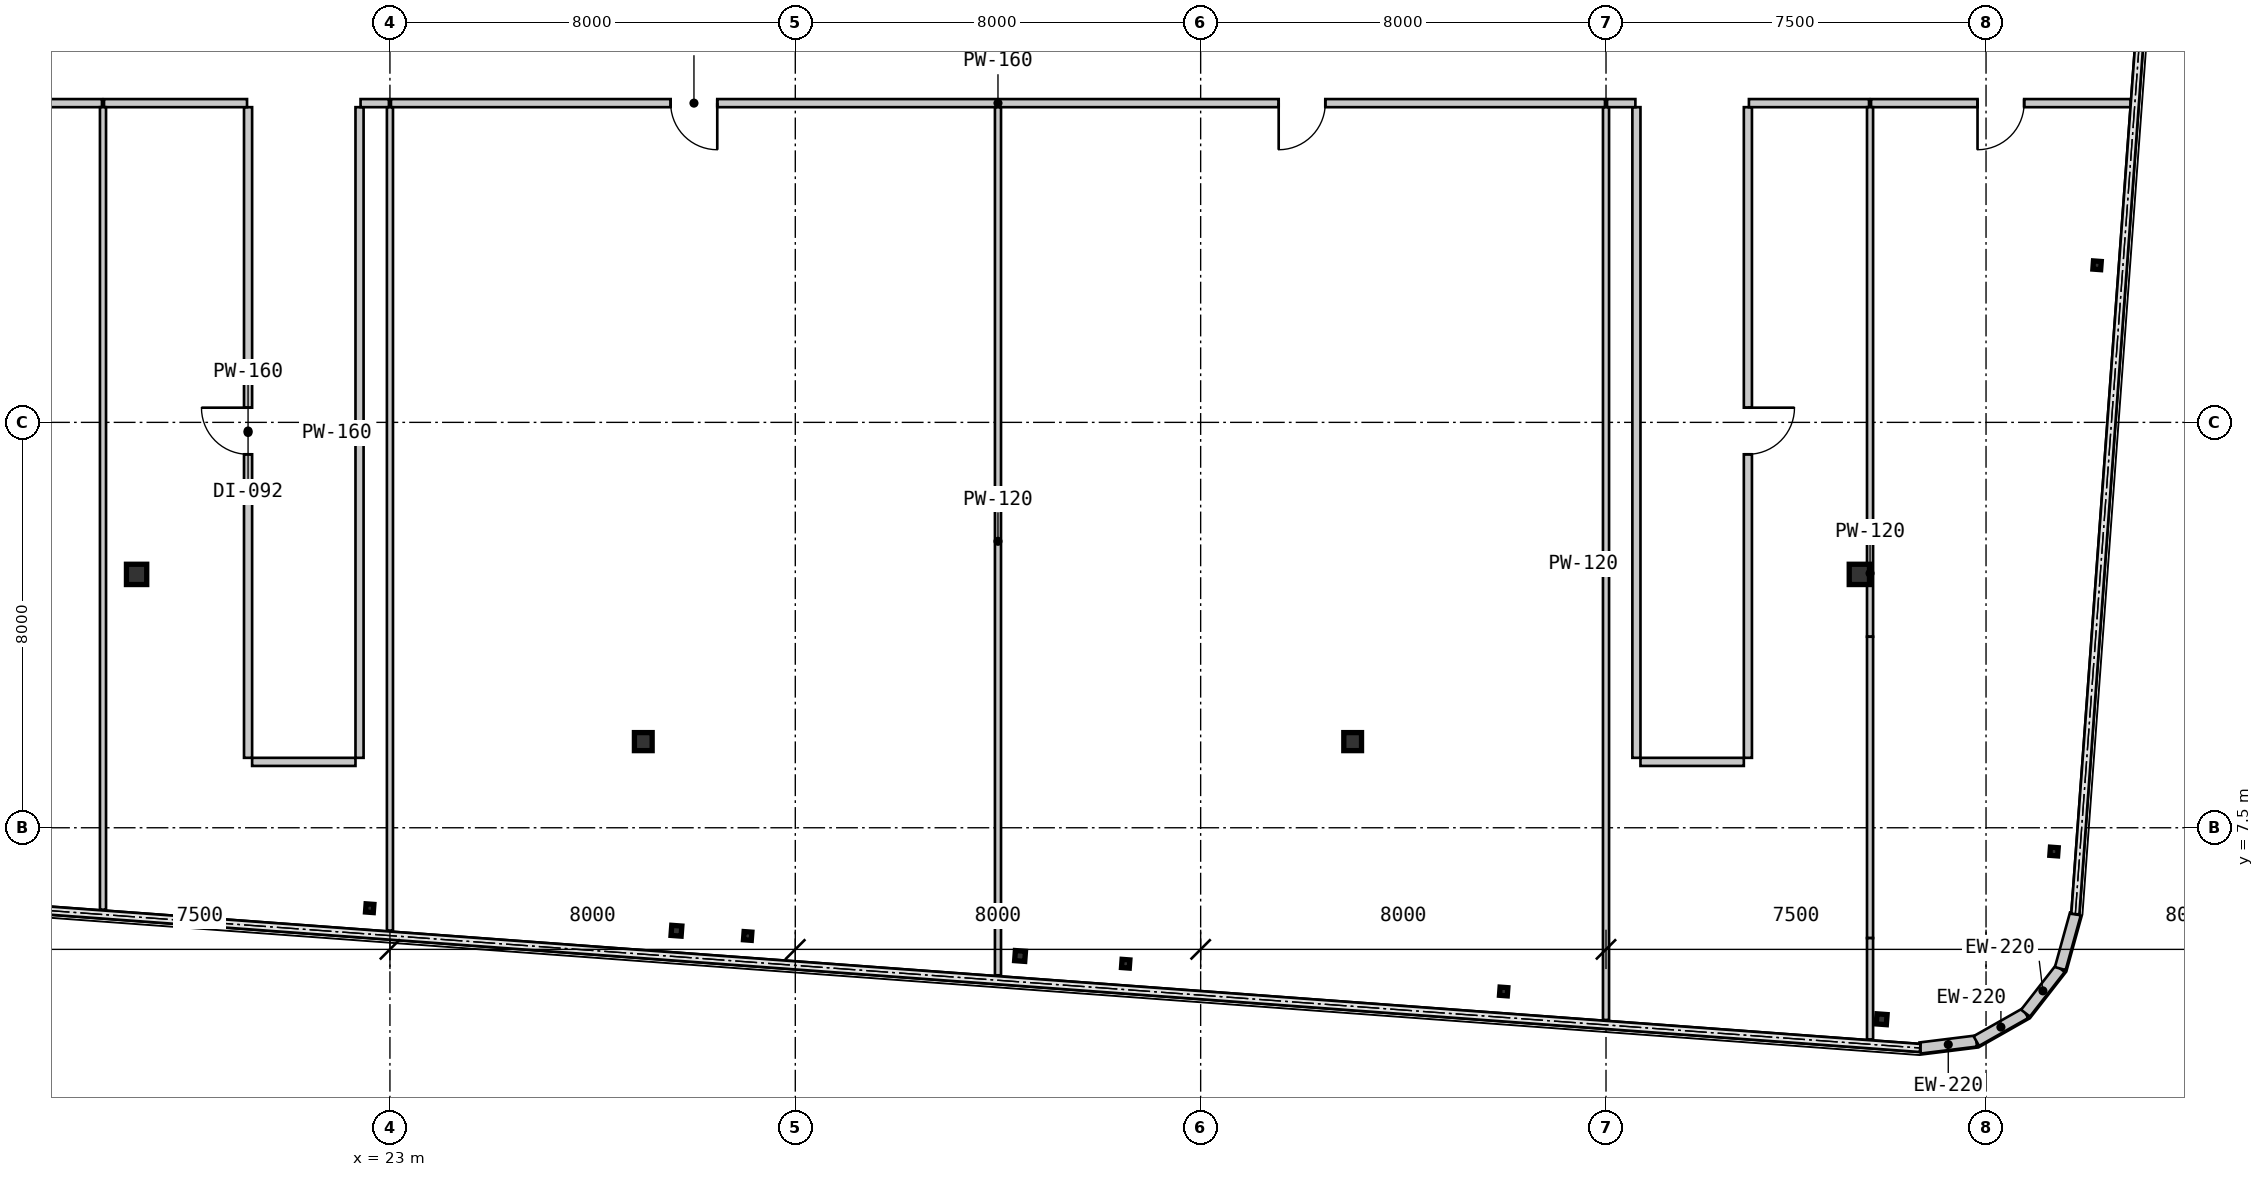
"""IFC4 building model, lengths in metres.
Left out: names, types, materials, properties, quantities, classifications, styles, units other than length and angle.
Written with IfcOpenShell. Run it as: python <this file> out.ifc"""

import sys

from ifc_helpers import new_model, si_unit, direction, frame, frame_2d, origin, origin_2d, place, context, subcontext, project, spatial, rectangle, hollow_rectangle, i_section, extrude, source, transform, mapped, element, fill, save


model = new_model("IFC4")
c1 = context("Model", 3, precision=1e-05, world=origin(), true_north=direction((0.0, 1.0)))
c2 = subcontext(c1, "Body", "Model", "MODEL_VIEW")
j1 = project(units=[si_unit("LENGTHUNIT", "METRE"), si_unit("PLANEANGLEUNIT", "RADIAN")], contexts=[c1])
p1 = place(None, origin())
s1 = spatial("IfcSite", under=j1, at=p1, CompositionType="ELEMENT")
p2 = place(p1, origin())
s2 = spatial("IfcBuilding", under=s1, at=p2, CompositionType="ELEMENT")
p3 = place(p2, frame((0.0, 0.0, 249.2)))
s3 = spatial("IfcBuildingStorey", under=s2, at=p3, CompositionType="ELEMENT", Elevation=249.2)
m1 = source(origin(), c2, "Body", "SweptSolid", [
    extrude(i_section(OverallWidth=0.35, OverallDepth=0.356, WebThickness=0.018, FlangeThickness=0.028, at=origin_2d()), origin(), (0.0, 0.0, 1.0), 3.85),
])
for number, where, z_axis, x_axis in (
    (1, (28.0, 9.2, 0.0), (0.0, 0.0, 1.0), (1.0, 0.0, 0.0)),
    (2, (42.0, 9.2, 0.0), (0.0, 0.0, 1.0), (1.0, 0.0, 0.0)),
):
    element("IfcColumn", number, at=place(p3, frame(where, z_axis=z_axis, x_axis=x_axis)), inside=s3, PredefinedType="COLUMN", context=c2, shape_type="MappedRepresentation", body=[
        mapped(m1, transform((0.0, 0.0, 0.0), scale=1.0)),
    ])
m2 = source(origin(), c2, "Body", "SweptSolid", [
    extrude(hollow_rectangle(XDim=0.4, YDim=0.4, WallThickness=0.016, at=origin_2d()), origin(), (0.0, 0.0, 1.0), 3.85),
])
for number, where, z_axis, x_axis in (
    (3, (18.0, 12.5, 0.0), (0.0, 0.0, 1.0), (1.0, 0.0, 0.0)),
    (4, (52.0, 12.5, 0.0), (0.0, 0.0, 1.0), (1.0, 0.0, 0.0)),
):
    element("IfcColumn", number, at=place(p3, frame(where, z_axis=z_axis, x_axis=x_axis)), inside=s3, PredefinedType="COLUMN", context=c2, shape_type="MappedRepresentation", body=[
        mapped(m2, transform((0.0, 0.0, 0.0), scale=1.0)),
    ])
m3 = source(origin(), c2, "Body", "SweptSolid", [
    extrude(i_section(OverallWidth=0.154, OverallDepth=0.162, WebThickness=0.008, FlangeThickness=0.011, at=origin_2d()), origin(), (0.0, 0.0, 1.0), 3.85),
])
for number, where, z_axis, x_axis in (
    (5, (22.601, 5.912, 0.0), (0.0, 0.0, 1.0), (0.997, -0.073, 0.0)),
    (6, (30.061, 5.365, 0.0), (0.0, 0.0, 1.0), (0.997, -0.073, 0.0)),
    (7, (37.521, 4.817, 0.0), (0.0, 0.0, 1.0), (0.997, -0.073, 0.0)),
    (8, (44.98, 4.269, 0.0), (0.0, 0.0, 1.0), (0.997, -0.073, 0.0)),
):
    element("IfcColumn", number, at=place(p3, frame(where, z_axis=z_axis, x_axis=x_axis)), inside=s3, PredefinedType="COLUMN", context=c2, shape_type="MappedRepresentation", body=[
        mapped(m3, transform((0.0, 0.0, 0.0), scale=1.0)),
    ])
m4 = source(origin(), c2, "Body", "SweptSolid", [
    extrude(hollow_rectangle(XDim=0.2, YDim=0.2, WallThickness=0.009, at=origin_2d()), origin(), (0.0, 0.0, 1.0), 3.85),
])
p4 = place(p3, frame((52.44, 3.721, 0.0), z_axis=(0.0, 0.0, 1.0), x_axis=(0.997314477224, -0.073238197128, 0.0)))
e9 = element("IfcColumn", 9, at=p4, inside=s3, PredefinedType="COLUMN", context=c2, shape_type="MappedRepresentation", body=[
    mapped(m4, transform((0.0, 0.0, 0.0), scale=1.0)),
])
for number, where, z_axis, x_axis in (
    (10, (55.842, 7.031, 0.0), (0.0, 0.0, 1.0), (0.997, -0.073, 0.0)),
    (11, (56.691, 18.6, 0.0), (0.0, 0.0, 1.0), (0.997, -0.073, 0.0)),
):
    element("IfcColumn", number, at=place(p3, frame(where, z_axis=z_axis, x_axis=x_axis)), inside=s3, PredefinedType="COLUMN", context=c2, shape_type="MappedRepresentation", body=[
        mapped(m3, transform((0.0, 0.0, 0.0), scale=1.0)),
    ])
for number, where, z_axis, x_axis in (
    (12, (28.654, 5.468, 0.0), (0.0, 0.0, 1.0), (0.997, -0.073, 0.0)),
    (13, (35.436, 4.97, 0.0), (0.0, 0.0, 1.0), (0.997, -0.073, 0.0)),
):
    element("IfcColumn", number, at=place(p3, frame(where, z_axis=z_axis, x_axis=x_axis)), inside=s3, PredefinedType="COLUMN", context=c2, shape_type="MappedRepresentation", body=[
        mapped(m4, transform((0.0, 0.0, 0.0), scale=1.0)),
    ])
m5 = source(origin(), c2, "Body", "SweptSolid", [
    extrude(rectangle(XDim=1.116, YDim=0.22, at=frame_2d((0.558, 0.0))), origin(), (0.0, 0.0, 1.0), 3.57),
])
p5 = place(p3, frame((53.201, 3.154, 0.0), z_axis=(0.0, 0.0, 1.0), x_axis=(0.992438604032, 0.122742076028, 0.0)))
e14 = element("IfcWall", 14, at=p5, inside=s3, PredefinedType="SOLIDWALL", context=c2, shape_type="MappedRepresentation", body=[
    mapped(m5, transform((0.0, 0.0, 0.0), scale=1.0)),
])
m6 = source(origin(), c2, "Body", "SweptSolid", [
    extrude(rectangle(XDim=1.116, YDim=0.22, at=frame_2d((0.558, 0.0))), origin(), (0.0, 0.0, 1.0), 3.57),
])
p6 = place(p3, frame((54.308, 3.291, 0.0), z_axis=(0.0, 0.0, 1.0), x_axis=(0.869893934693, 0.49323882895, 0.0)))
e15 = element("IfcWall", 15, at=p6, inside=s3, PredefinedType="SOLIDWALL", context=c2, shape_type="MappedRepresentation", body=[
    mapped(m6, transform((0.0, 0.0, 0.0), scale=1.0)),
])
for number, where, z_axis, x_axis in (
    (16, (55.279, 3.841, 0.0), (0.0, 0.0, 1.0), (0.615, 0.789, 0.0)),
    (17, (55.965, 4.721, 0.0), (0.0, 0.0, 1.0), (0.266, 0.964, 0.0)),
):
    element("IfcWall", number, at=place(p3, frame(where, z_axis=z_axis, x_axis=x_axis)), inside=s3, PredefinedType="SOLIDWALL", context=c2, shape_type="MappedRepresentation", body=[
        mapped(m5, transform((0.0, 0.0, 0.0), scale=1.0)),
    ])
m7 = source(origin(), c2, "Body", "SweptSolid", [
    extrude(rectangle(XDim=4.624, YDim=0.16, at=frame_2d((2.312, 0.0))), origin(), (0.0, 0.0, 1.0), 3.57),
])
p7 = place(p3, frame((17.317, 21.8, 0.0), z_axis=(0.0, 0.0, 1.0), x_axis=(-1.0, 0.0, 0.0)))
e18 = element("IfcWall", 18, at=p7, inside=s3, PredefinedType="PARTITIONING", context=c2, shape_type="MappedRepresentation", body=[
    mapped(m7, transform((0.0, 0.0, 0.0), scale=1.0)),
])
m8 = source(origin(), c2, "Body", "SweptSolid", [
    extrude(rectangle(XDim=0.92, YDim=2.1, at=frame_2d((0.46, 1.05))), frame((0.0, 0.09, 0.0), z_axis=(0.0, -1.0, 0.0), x_axis=(1.0, 0.0, 0.0)), (0.0, 0.0, 1.0), 0.18),
])
p8 = place(p7, frame((1.852, 0.0, 0.0)))
e19 = element("IfcOpeningElement", 19, at=p8, cuts=e18, PredefinedType="OPENING", context=c2, shape_type="MappedRepresentation", body=[
    mapped(m8, transform((0.0, 0.0, 0.0), scale=1.0)),
])
m9 = source(origin(), c2, "Body", "SweptSolid", [
    extrude(rectangle(XDim=12.84, YDim=0.16, at=frame_2d((6.42, 0.0))), origin(), (0.0, 0.0, 1.0), 3.57),
])
p9 = place(p3, frame((20.2, 8.88, 0.0), z_axis=(0.0, 0.0, 1.0), x_axis=(0.0, 1.0, 0.0)))
e20 = element("IfcWall", 20, at=p9, inside=s3, PredefinedType="PARTITIONING", context=c2, shape_type="MappedRepresentation", body=[
    mapped(m9, transform((0.0, 0.0, 0.0), scale=1.0)),
])
p10 = place(p9, frame((5.99, 0.0, 0.0)))
e21 = element("IfcOpeningElement", 21, at=p10, cuts=e20, PredefinedType="OPENING", context=c2, shape_type="MappedRepresentation", body=[
    mapped(m8, transform((0.0, 0.0, 0.0), scale=1.0)),
])
p11 = place(p3, frame((22.4, 21.72, 0.0), z_axis=(0.0, 0.0, 1.0), x_axis=(0.0, -1.0, 0.0)))
e22 = element("IfcWall", 22, at=p11, inside=s3, PredefinedType="PARTITIONING", context=c2, shape_type="MappedRepresentation", body=[
    mapped(m9, transform((0.0, 0.0, 0.0), scale=1.0)),
])
m10 = source(origin(), c2, "Body", "SweptSolid", [
    extrude(rectangle(XDim=2.823, YDim=0.16, at=frame_2d((1.411, 0.0))), origin(), (0.0, 0.0, 1.0), 3.57),
])
p12 = place(p3, frame((20.18, 21.8, 0.0), z_axis=(0.0, 0.0, 1.0), x_axis=(-1.0, 0.0, 0.0)))
e23 = element("IfcWall", 23, at=p12, inside=s3, PredefinedType="PARTITIONING", context=c2, shape_type="MappedRepresentation", body=[
    mapped(m10, transform((0.0, 0.0, 0.0), scale=1.0)),
])
m11 = source(origin(), c2, "Body", "SweptSolid", [
    extrude(rectangle(XDim=2.04, YDim=0.16, at=frame_2d((1.02, 0.0))), origin(), (0.0, 0.0, 1.0), 3.57),
])
p13 = place(p3, frame((22.32, 8.8, 0.0), z_axis=(0.0, 0.0, 1.0), x_axis=(-1.0, 0.0, 0.0)))
e24 = element("IfcWall", 24, at=p13, inside=s3, PredefinedType="PARTITIONING", context=c2, shape_type="MappedRepresentation", body=[
    mapped(m11, transform((0.0, 0.0, 0.0), scale=1.0)),
])
m12 = source(origin(), c2, "Body", "SweptSolid", [
    extrude(rectangle(XDim=0.559, YDim=0.16, at=frame_2d((0.28, 0.0))), origin(), (0.0, 0.0, 1.0), 3.57),
])
p14 = place(p3, frame((22.98, 21.8, 0.0), z_axis=(0.0, 0.0, 1.0), x_axis=(-1.0, 0.0, 0.0)))
e25 = element("IfcWall", 25, at=p14, inside=s3, PredefinedType="PARTITIONING", context=c2, shape_type="MappedRepresentation", body=[
    mapped(m12, transform((0.0, 0.0, 0.0), scale=1.0)),
])
m13 = source(origin(), c2, "Body", "SweptSolid", [
    extrude(rectangle(XDim=11.959, YDim=0.16, at=frame_2d((5.98, 0.0))), origin(), (0.0, 0.0, 1.0), 3.57),
])
p15 = place(p3, frame((34.98, 21.8, 0.0), z_axis=(0.0, 0.0, 1.0), x_axis=(-1.0, 0.0, 0.0)))
e26 = element("IfcWall", 26, at=p15, inside=s3, PredefinedType="PARTITIONING", context=c2, shape_type="MappedRepresentation", body=[
    mapped(m13, transform((0.0, 0.0, 0.0), scale=1.0)),
])
p16 = place(p15, frame((5.52, 0.0, 0.0)))
e27 = element("IfcOpeningElement", 27, at=p16, cuts=e26, PredefinedType="OPENING", context=c2, shape_type="MappedRepresentation", body=[
    mapped(m8, transform((0.0, 0.0, 0.0), scale=1.0)),
])
p17 = place(p3, frame((46.98, 21.8, 0.0), z_axis=(0.0, 0.0, 1.0), x_axis=(-1.0, 0.0, 0.0)))
e28 = element("IfcWall", 28, at=p17, inside=s3, PredefinedType="PARTITIONING", context=c2, shape_type="MappedRepresentation", body=[
    mapped(m13, transform((0.0, 0.0, 0.0), scale=1.0)),
])
p18 = place(p17, frame((5.52, 0.0, 0.0)))
e29 = element("IfcOpeningElement", 29, at=p18, cuts=e28, PredefinedType="OPENING", context=c2, shape_type="MappedRepresentation", body=[
    mapped(m8, transform((0.0, 0.0, 0.0), scale=1.0)),
])
p19 = place(p3, frame((47.6, 8.88, 0.0), z_axis=(0.0, 0.0, 1.0), x_axis=(0.0, 1.0, 0.0)))
e30 = element("IfcWall", 30, at=p19, inside=s3, PredefinedType="PARTITIONING", context=c2, shape_type="MappedRepresentation", body=[
    mapped(m9, transform((0.0, 0.0, 0.0), scale=1.0)),
])
p20 = place(p3, frame((49.8, 21.72, 0.0), z_axis=(0.0, 0.0, 1.0), x_axis=(0.0, -1.0, 0.0)))
e31 = element("IfcWall", 31, at=p20, inside=s3, PredefinedType="PARTITIONING", context=c2, shape_type="MappedRepresentation", body=[
    mapped(m9, transform((0.0, 0.0, 0.0), scale=1.0)),
])
p21 = place(p20, frame((5.93, 0.0, 0.0)))
e32 = element("IfcOpeningElement", 32, at=p21, cuts=e31, PredefinedType="OPENING", context=c2, shape_type="MappedRepresentation", body=[
    mapped(m8, transform((0.0, 0.0, 0.0), scale=1.0)),
])
m14 = source(origin(), c2, "Body", "SweptSolid", [
    extrude(rectangle(XDim=2.37, YDim=0.16, at=frame_2d((1.185, 0.0))), origin(), (0.0, 0.0, 1.0), 3.57),
])
p22 = place(p3, frame((52.191, 21.8, 0.0), z_axis=(0.0, 0.0, 1.0), x_axis=(-1.0, 0.0, 0.0)))
e33 = element("IfcWall", 33, at=p22, inside=s3, PredefinedType="PARTITIONING", context=c2, shape_type="MappedRepresentation", body=[
    mapped(m14, transform((0.0, 0.0, 0.0), scale=1.0)),
])
p23 = place(p3, frame((49.72, 8.8, 0.0), z_axis=(0.0, 0.0, 1.0), x_axis=(-1.0, 0.0, 0.0)))
e34 = element("IfcWall", 34, at=p23, inside=s3, PredefinedType="PARTITIONING", context=c2, shape_type="MappedRepresentation", body=[
    mapped(m11, transform((0.0, 0.0, 0.0), scale=1.0)),
])
p24 = place(p3, frame((47.58, 21.8, 0.0), z_axis=(0.0, 0.0, 1.0), x_axis=(-1.0, 0.0, 0.0)))
e35 = element("IfcWall", 35, at=p24, inside=s3, PredefinedType="PARTITIONING", context=c2, shape_type="MappedRepresentation", body=[
    mapped(m12, transform((0.0, 0.0, 0.0), scale=1.0)),
])
m15 = source(origin(), c2, "Body", "SweptSolid", [
    extrude(rectangle(XDim=5.122, YDim=0.16, at=frame_2d((2.561, 0.0))), origin(), (0.0, 0.0, 1.0), 3.57),
])
p25 = place(p3, frame((57.353, 21.8, 0.0), z_axis=(0.0, 0.0, 1.0), x_axis=(-1.0, 0.0, 0.0)))
e36 = element("IfcWall", 36, at=p25, inside=s3, PredefinedType="PARTITIONING", context=c2, shape_type="MappedRepresentation", body=[
    mapped(m15, transform((0.0, 0.0, 0.0), scale=1.0)),
])
p26 = place(p25, frame((2.101, 0.0, 0.0)))
e37 = element("IfcOpeningElement", 37, at=p26, cuts=e36, PredefinedType="OPENING", context=c2, shape_type="MappedRepresentation", body=[
    mapped(m8, transform((0.0, 0.0, 0.0), scale=1.0)),
])
m16 = source(origin(), c2, "Body", "SweptSolid", [
    extrude(rectangle(XDim=15.836, YDim=0.12, at=frame_2d((7.918, 0.0))), origin(), (0.0, 0.0, 1.0), 3.57),
])
p27 = place(p3, frame((17.337, 21.72, 0.0), z_axis=(0.0, 0.0, 1.0), x_axis=(0.0, -1.0, 0.0)))
e38 = element("IfcWall", 38, at=p27, inside=s3, PredefinedType="PARTITIONING", context=c2, shape_type="MappedRepresentation", body=[
    mapped(m16, transform((0.0, 0.0, 0.0), scale=1.0)),
])
m17 = source(origin(), c2, "Body", "SweptSolid", [
    extrude(rectangle(XDim=16.248, YDim=0.12, at=frame_2d((8.124, 0.0))), origin(), (0.0, 0.0, 1.0), 3.57),
])
p28 = place(p3, frame((23.0, 21.718, 0.0), z_axis=(0.0, 0.0, 1.0), x_axis=(0.0, -1.0, 0.0)))
e39 = element("IfcWall", 39, at=p28, inside=s3, PredefinedType="PARTITIONING", context=c2, shape_type="MappedRepresentation", body=[
    mapped(m17, transform((0.0, 0.0, 0.0), scale=1.0)),
])
m18 = source(origin(), c2, "Body", "SweptSolid", [
    extrude(rectangle(XDim=17.13, YDim=0.12, at=frame_2d((8.565, 0.0))), origin(), (0.0, 0.0, 1.0), 3.57),
])
p29 = place(p3, frame((35.0, 21.718, 0.0), z_axis=(0.0, 0.0, 1.0), x_axis=(0.0, -1.0, 0.0)))
e40 = element("IfcWall", 40, at=p29, inside=s3, PredefinedType="PARTITIONING", context=c2, shape_type="MappedRepresentation", body=[
    mapped(m18, transform((0.0, 0.0, 0.0), scale=1.0)),
])
m19 = source(origin(), c2, "Body", "SweptSolid", [
    extrude(rectangle(XDim=18.011, YDim=0.12, at=frame_2d((9.005, 0.0))), origin(), (0.0, 0.0, 1.0), 3.57),
])
p30 = place(p3, frame((47.0, 21.718, 0.0), z_axis=(0.0, 0.0, 1.0), x_axis=(0.0, -1.0, 0.0)))
e41 = element("IfcWall", 41, at=p30, inside=s3, PredefinedType="PARTITIONING", context=c2, shape_type="MappedRepresentation", body=[
    mapped(m19, transform((0.0, 0.0, 0.0), scale=1.0)),
])
m20 = source(origin(), c2, "Body", "SweptSolid", [
    extrude(rectangle(XDim=10.45, YDim=0.12, at=frame_2d((5.225, 0.0))), origin(), (0.0, 0.0, 1.0), 3.57),
])
p31 = place(p3, frame((52.211, 21.72, 0.0), z_axis=(0.0, 0.0, 1.0), x_axis=(0.0, -1.0, 0.0)))
e42 = element("IfcWall", 42, at=p31, inside=s3, PredefinedType="PARTITIONING", context=c2, shape_type="MappedRepresentation", body=[
    mapped(m20, transform((0.0, 0.0, 0.0), scale=1.0)),
])
m21 = source(origin(), c2, "Body", "SweptSolid", [
    extrude(rectangle(XDim=5.947, YDim=0.12, at=frame_2d((2.974, 0.0))), origin(), (0.0, 0.0, 1.0), 3.164),
])
p32 = place(p3, frame((52.211, 11.27, 0.0), z_axis=(0.0, 0.0, 1.0), x_axis=(0.0, -1.0, 0.0)))
e43 = element("IfcWall", 43, at=p32, inside=s3, PredefinedType="PARTITIONING", context=c2, shape_type="MappedRepresentation", body=[
    mapped(m21, transform((0.0, 0.0, 0.0), scale=1.0)),
])
m22 = source(origin(), c2, "Body", "SweptSolid", [
    extrude(rectangle(XDim=2.0, YDim=0.12, at=frame_2d((1.0, 0.0))), origin(), (0.0, 0.0, 1.0), 3.57),
])
p33 = place(p3, frame((52.211, 5.323, 0.0), z_axis=(0.0, 0.0, 1.0), x_axis=(0.0, -1.0, 0.0)))
e44 = element("IfcWall", 44, at=p33, inside=s3, PredefinedType="PARTITIONING", context=c2, shape_type="MappedRepresentation", body=[
    mapped(m22, transform((0.0, 0.0, 0.0), scale=1.0)),
])
m23 = source(origin(), c2, "Body", "SweptSolid", [
    extrude(rectangle(XDim=0.92, YDim=2.1, at=frame_2d((0.46, 1.05))), frame((0.0, 0.025, 0.0), z_axis=(0.0, -1.0, 0.0), x_axis=(1.0, 0.0, 0.0)), (0.0, 0.0, 1.0), 0.05),
])
p34 = place(p10, origin())
e45 = element("IfcDoor", 45, at=p34, inside=s3, OperationType="SINGLE_SWING_RIGHT", PredefinedType="DOOR", context=c2, shape_type="MappedRepresentation", body=[
    mapped(m23, transform((0.0, 0.0, 0.0), scale=1.0)),
])
fill(e21, e45)
p35 = place(p16, origin())
e46 = element("IfcDoor", 46, at=p35, inside=s3, OperationType="SINGLE_SWING_LEFT", PredefinedType="DOOR", context=c2, shape_type="MappedRepresentation", body=[
    mapped(m23, transform((0.0, 0.0, 0.0), scale=1.0)),
])
fill(e27, e46)
p36 = place(p18, origin())
e47 = element("IfcDoor", 47, at=p36, inside=s3, OperationType="SINGLE_SWING_RIGHT", PredefinedType="DOOR", context=c2, shape_type="MappedRepresentation", body=[
    mapped(m23, transform((0.0, 0.0, 0.0), scale=1.0)),
])
fill(e29, e47)
p37 = place(p21, origin())
e48 = element("IfcDoor", 48, at=p37, inside=s3, OperationType="SINGLE_SWING_LEFT", PredefinedType="DOOR", context=c2, shape_type="MappedRepresentation", body=[
    mapped(m23, transform((0.0, 0.0, 0.0), scale=1.0)),
])
fill(e32, e48)
p38 = place(p26, origin())
e49 = element("IfcDoor", 49, at=p38, inside=s3, OperationType="SINGLE_SWING_RIGHT", PredefinedType="DOOR", context=c2, shape_type="MappedRepresentation", body=[
    mapped(m23, transform((0.0, 0.0, 0.0), scale=1.0)),
])
fill(e37, e49)
save(model, sys.argv[1])
